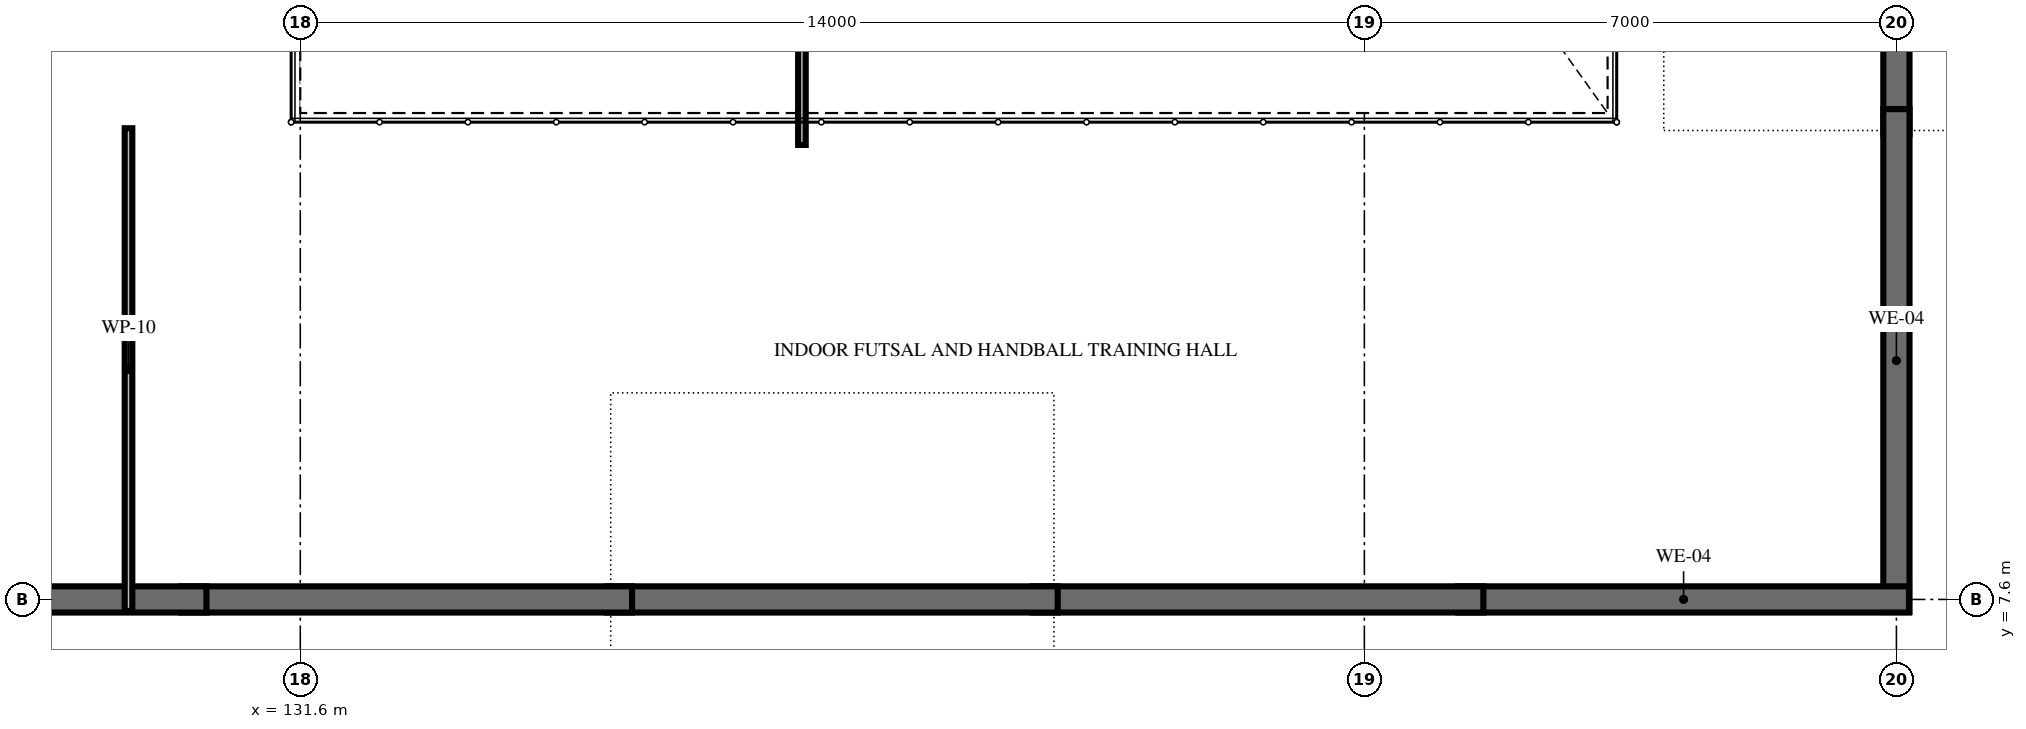
"""IFC4 building model, lengths in metres.
Left out: names, types, materials, properties, quantities, classifications, styles, units other than length and angle.
Written with IfcOpenShell. Run it as: python <this file> out.ifc"""

import sys

from ifc_helpers import new_model, si_unit, direction, frame, frame_2d, origin, place, context, subcontext, project, spatial, rectangle, extrude, element, save


model = new_model("IFC4")
c1 = context("Model", 3, precision=1e-05, world=origin(), true_north=direction((0.0, 1.0)))
c2 = subcontext(c1, "Body", "Model", "MODEL_VIEW")
j1 = project(units=[si_unit("LENGTHUNIT", "METRE"), si_unit("PLANEANGLEUNIT", "RADIAN")], contexts=[c1])
p1 = place(None, origin())
s1 = spatial("IfcSite", under=j1, at=p1, CompositionType="ELEMENT")
p2 = place(p1, origin())
s2 = spatial("IfcBuilding", under=s1, at=p2, CompositionType="ELEMENT")
p3 = place(p2, frame((0.0, 0.0, 10.8)))
s3 = spatial("IfcBuildingStorey", under=s2, at=p3, CompositionType="ELEMENT", Elevation=10.8)
p4 = place(p3, frame((152.6, 20.337, 0.0), z_axis=(0.0, 0.0, 1.0), x_axis=(0.0, -1.0, 0.0)))
e1 = element("IfcWall", 1, at=p4, inside=s3, PredefinedType="SOLIDWALL", context=c2, shape_type="SweptSolid", body=[
    extrude(rectangle(XDim=6.617, YDim=0.345, at=frame_2d((3.308, 0.0))), origin(), (0.0, 0.0, 1.0), 5.268),
])
p5 = place(p3, frame((152.6, 14.051, 0.0), z_axis=(0.0, 0.0, 1.0), x_axis=(0.0, -1.0, 0.0)))
e2 = element("IfcWall", 2, at=p5, inside=s3, PredefinedType="SOLIDWALL", context=c2, shape_type="SweptSolid", body=[
    extrude(rectangle(XDim=6.617, YDim=0.345, at=frame_2d((3.309, 0.0))), origin(), (0.0, 0.0, 1.0), 5.08),
])
for number, where, z_axis, x_axis in (
    (3, (152.766, 7.6, 0.0), (0.0, 0.0, 1.0), (-1.0, 0.0, 0.0)),
    (4, (147.166, 7.6, 0.0), (0.0, 0.0, 1.0), (-1.0, 0.0, 0.0)),
    (5, (141.566, 7.6, 0.0), (0.0, 0.0, 1.0), (-1.0, 0.0, 0.0)),
    (6, (135.966, 7.6, 0.0), (0.0, 0.0, 1.0), (-1.0, 0.0, 0.0)),
    (7, (130.365, 7.6, 0.0), (0.0, 0.0, 1.0), (-1.0, 0.0, 0.0)),
):
    element("IfcWall", number, at=place(p3, frame(where, z_axis=z_axis, x_axis=x_axis)), inside=s3, PredefinedType="SOLIDWALL", context=c2, shape_type="SweptSolid", body=[
        extrude(rectangle(XDim=5.931, YDim=0.345, at=frame_2d((2.966, 0.0))), origin(), (0.0, 0.0, 1.0), 5.08),
    ])
p6 = place(p3, frame((129.34, 7.448, 0.0), z_axis=(0.0, 0.0, 1.0), x_axis=(0.0, 1.0, 0.0)))
e8 = element("IfcWall", 8, at=p6, inside=s3, PredefinedType="PARTITIONING", context=c2, shape_type="SweptSolid", body=[
    extrude(rectangle(XDim=6.352, YDim=0.1, at=frame_2d((3.176, 0.0))), origin(), (0.0, 0.0, 1.0), 5.082),
])
p7 = place(p3, frame((138.2, 16.28, 0.0), z_axis=(0.0, 0.0, 1.0), x_axis=(0.0, -1.0, 0.0)))
e9 = element("IfcWall", 9, at=p7, inside=s3, PredefinedType="PARTITIONING", context=c2, shape_type="SweptSolid", body=[
    extrude(rectangle(XDim=2.7, YDim=0.1, at=frame_2d((1.35, 0.0))), origin(), (0.0, 0.0, 1.0), 5.65),
])
save(model, sys.argv[1])
